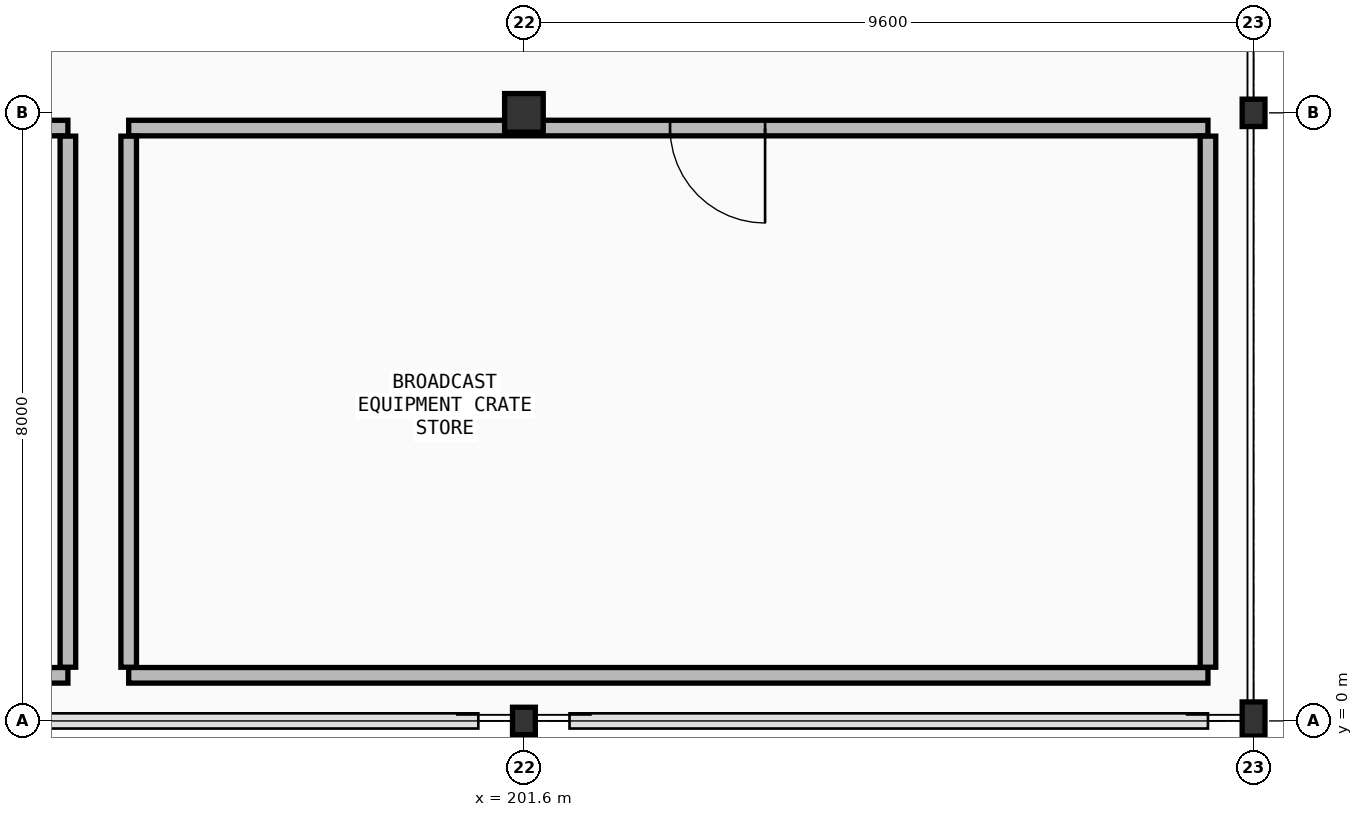
"""IFC4 building model, lengths in metres.
Left out: names, types, materials, properties, quantities, classifications, styles, units other than length and angle.
Written with IfcOpenShell. Run it as: python <this file> out.ifc"""

import sys

from ifc_helpers import new_model, si_unit, direction, frame, frame_2d, origin, origin_2d, place, context, subcontext, project, spatial, rectangle, hollow_circle, i_section, extrude, element, fill, save


model = new_model("IFC4")
c1 = context("Model", 3, precision=1e-05, world=origin(), true_north=direction((0.0, 1.0)))
c2 = subcontext(c1, "Body", "Model", "MODEL_VIEW")
j1 = project(units=[si_unit("LENGTHUNIT", "METRE"), si_unit("PLANEANGLEUNIT", "RADIAN")], contexts=[c1])
p1 = place(None, origin())
s1 = spatial("IfcSite", under=j1, at=p1, CompositionType="ELEMENT")
p2 = place(p1, origin())
s2 = spatial("IfcBuilding", under=s1, at=p2, CompositionType="ELEMENT")
p3 = place(p2, frame((0.0, 0.0, 15.9)))
s3 = spatial("IfcBuildingStorey", under=s2, at=p3, CompositionType="ELEMENT", Elevation=15.9)
p4 = place(p3, frame((201.6, 0.0, 0.0), z_axis=(0.0, 0.0, 1.0), x_axis=(1.0, 0.0, 0.0)))
e1 = element("IfcColumn", 1, at=p4, inside=s3, PredefinedType="COLUMN", context=c2, shape_type="SweptSolid", body=[
    extrude(i_section(OverallWidth=0.3, OverallDepth=0.36, WebThickness=0.012, FlangeThickness=0.022, FilletRadius=0.027, at=origin_2d()), origin(), (0.0, 0.0, 1.0), 4.5),
])
p5 = place(p3, frame((201.6, 8.0, 0.0), z_axis=(0.0, 0.0, 1.0), x_axis=(1.0, 0.0, 0.0)))
e2 = element("IfcColumn", 2, at=p5, inside=s3, PredefinedType="COLUMN", context=c2, shape_type="SweptSolid", body=[
    extrude(hollow_circle(Radius=0.254, WallThickness=0.025, at=origin_2d()), origin(), (0.0, 0.0, 1.0), 4.5),
])
p6 = place(p3, frame((211.2, 0.0, 0.0), z_axis=(0.0, 0.0, 1.0), x_axis=(1.0, 0.0, 0.0)))
e3 = element("IfcColumn", 3, at=p6, inside=s3, PredefinedType="COLUMN", context=c2, shape_type="SweptSolid", body=[
    extrude(i_section(OverallWidth=0.3, OverallDepth=0.5, WebThickness=0.014, FlangeThickness=0.028, FilletRadius=0.027, at=origin_2d()), origin(), (0.0, 0.0, 1.0), 4.5),
])
p7 = place(p3, frame((211.2, 8.0, 0.0), z_axis=(0.0, 0.0, 1.0), x_axis=(1.0, 0.0, 0.0)))
e4 = element("IfcColumn", 4, at=p7, inside=s3, PredefinedType="COLUMN", context=c2, shape_type="SweptSolid", body=[
    extrude(i_section(OverallWidth=0.3, OverallDepth=0.36, WebThickness=0.012, FlangeThickness=0.022, FilletRadius=0.027, at=origin_2d()), origin(), (0.0, 0.0, 1.0), 4.5),
])
p8 = place(p3, frame((195.6, 7.8, 0.0), z_axis=(0.0, 0.0, 1.0), x_axis=(-1.0, 0.0, 0.0)))
e5 = element("IfcWall", 5, at=p8, inside=s3, PredefinedType="SOLIDWALL", context=c2, shape_type="SweptSolid", body=[
    extrude(rectangle(XDim=22.4, YDim=0.205, at=frame_2d((11.2, 0.0))), origin(), (0.0, 0.0, 1.0), 2.905),
])
p9 = place(p8, frame((9.545, 0.0, 0.0)))
e6 = element("IfcOpeningElement", 6, at=p9, cuts=e5, PredefinedType="OPENING", context=c2, shape_type="SweptSolid", body=[
    extrude(rectangle(XDim=1.19, YDim=2.34, at=frame_2d((0.595, 1.17))), frame((0.0, 0.113, 0.0), z_axis=(0.0, -1.0, 0.0), x_axis=(1.0, 0.0, 0.0)), (0.0, 0.0, 1.0), 0.225),
])
p10 = place(p3, frame((173.2, 0.6, 0.0), z_axis=(0.0, 0.0, 1.0), x_axis=(1.0, 0.0, 0.0)))
e7 = element("IfcWall", 7, at=p10, inside=s3, PredefinedType="SOLIDWALL", context=c2, shape_type="SweptSolid", body=[
    extrude(rectangle(XDim=22.4, YDim=0.205, at=frame_2d((11.2, 0.0))), origin(), (0.0, 0.0, 1.0), 2.905),
])
p11 = place(p3, frame((195.6, 0.707, 0.0), z_axis=(0.0, 0.0, 1.0), x_axis=(0.0, 1.0, 0.0)))
e8 = element("IfcWall", 8, at=p11, inside=s3, PredefinedType="SOLIDWALL", context=c2, shape_type="SweptSolid", body=[
    extrude(rectangle(XDim=6.987, YDim=0.205, at=frame_2d((3.494, 0.0))), origin(), (0.0, 0.0, 1.0), 3.835),
])
p12 = place(p3, frame((210.6, 7.8, 0.0), z_axis=(0.0, 0.0, 1.0), x_axis=(-1.0, 0.0, 0.0)))
e9 = element("IfcWall", 9, at=p12, inside=s3, PredefinedType="SOLIDWALL", context=c2, shape_type="SweptSolid", body=[
    extrude(rectangle(XDim=14.2, YDim=0.205, at=frame_2d((7.1, 0.0))), origin(), (0.0, 0.0, 1.0), 3.205),
])
p13 = place(p12, frame((5.827, 0.0, 0.0)))
e10 = element("IfcOpeningElement", 10, at=p13, cuts=e9, PredefinedType="OPENING", context=c2, shape_type="SweptSolid", body=[
    extrude(rectangle(XDim=1.25, YDim=2.38, at=frame_2d((0.625, 1.19))), frame((0.0, 0.113, 0.0), z_axis=(0.0, -1.0, 0.0), x_axis=(1.0, 0.0, 0.0)), (0.0, 0.0, 1.0), 0.225),
])
p14 = place(p3, frame((196.4, 0.6, 0.0), z_axis=(0.0, 0.0, 1.0), x_axis=(1.0, 0.0, 0.0)))
e11 = element("IfcWall", 11, at=p14, inside=s3, PredefinedType="SOLIDWALL", context=c2, shape_type="SweptSolid", body=[
    extrude(rectangle(XDim=14.2, YDim=0.205, at=frame_2d((7.1, 0.0))), origin(), (0.0, 0.0, 1.0), 3.205),
])
for number, where, z_axis, x_axis in (
    (12, (210.6, 0.707, 0.0), (0.0, 0.0, 1.0), (0.0, 1.0, 0.0)),
    (13, (196.4, 7.694, 0.0), (0.0, 0.0, 1.0), (0.0, -1.0, 0.0)),
):
    element("IfcWall", number, at=place(p3, frame(where, z_axis=z_axis, x_axis=x_axis)), inside=s3, PredefinedType="SOLIDWALL", context=c2, shape_type="SweptSolid", body=[
        extrude(rectangle(XDim=6.987, YDim=0.205, at=frame_2d((3.494, 0.0))), origin(), (0.0, 0.0, 1.0), 3.835),
    ])
p15 = place(p13, origin())
e14 = element("IfcDoor", 14, at=p15, inside=s3, OperationType="SINGLE_SWING_LEFT", PredefinedType="DOOR", context=c2, shape_type="SweptSolid", body=[
    extrude(rectangle(XDim=1.25, YDim=2.38, at=frame_2d((0.625, 1.19))), frame((0.0, 0.025, 0.0), z_axis=(0.0, -1.0, 0.0), x_axis=(1.0, 0.0, 0.0)), (0.0, 0.0, 1.0), 0.05),
])
fill(e10, e14)
save(model, sys.argv[1])
